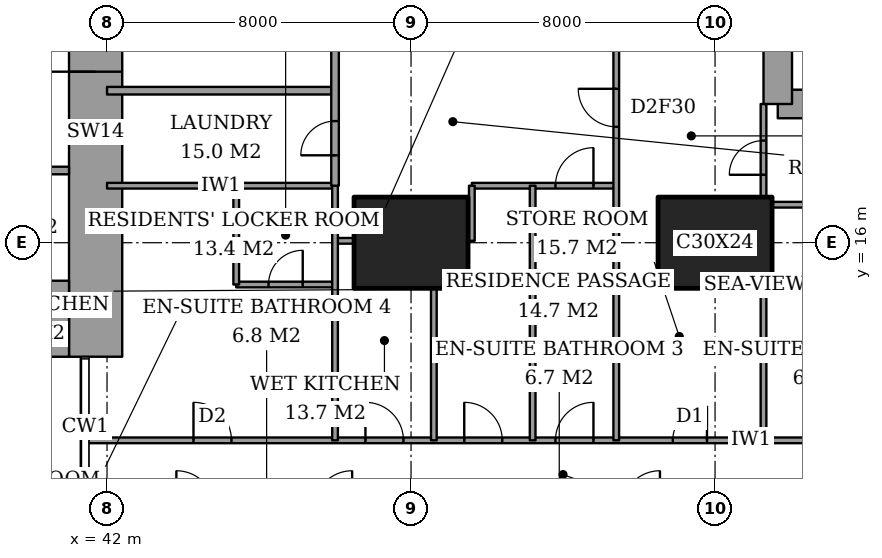
"""IFC4 building model, lengths in metres.
Left out: names, types, materials, properties, quantities, classifications, styles, units other than length and angle.
Written with IfcOpenShell. Run it as: python <this file> out.ifc"""

import sys

from ifc_helpers import new_model, si_unit, direction, frame, frame_2d, origin, origin_2d, place, context, subcontext, project, spatial, rectangle, extrude, element, fill, save


model = new_model("IFC4")
c1 = context("Model", 3, precision=1e-05, world=origin(), true_north=direction((0.0, 1.0)))
c2 = subcontext(c1, "Body", "Model", "MODEL_VIEW")
j1 = project(units=[si_unit("LENGTHUNIT", "METRE"), si_unit("PLANEANGLEUNIT", "RADIAN")], contexts=[c1])
p1 = place(None, origin())
s1 = spatial("IfcSite", under=j1, at=p1, CompositionType="ELEMENT")
p2 = place(p1, origin())
s2 = spatial("IfcBuilding", under=s1, at=p2, CompositionType="ELEMENT")
p3 = place(p2, frame((0.0, 0.0, 51.2)))
s3 = spatial("IfcBuildingStorey", under=s2, at=p3, CompositionType="ELEMENT", Elevation=51.2)
for number, where, z_axis, x_axis in (
    (1, (50.0, 16.0, 0.0), (0.0, 0.0, 1.0), (1.0, 0.0, 0.0)),
    (2, (58.0, 16.0, 0.0), (0.0, 0.0, 1.0), (1.0, 0.0, 0.0)),
):
    element("IfcColumn", number, at=place(p3, frame(where, z_axis=z_axis, x_axis=x_axis)), inside=s3, PredefinedType="COLUMN", context=c2, shape_type="SweptSolid", body=[
        extrude(rectangle(XDim=3.0, YDim=2.4, at=origin_2d()), origin(), (0.0, 0.0, 1.0), 3.6),
    ])
p4 = place(p3, frame((37.85, 14.0, 0.0), z_axis=(0.0, 0.0, 1.0), x_axis=(1.0, 0.0, 0.0)))
e3 = element("IfcWall", 3, at=p4, inside=s3, PredefinedType="SHEAR", context=c2, shape_type="SweptSolid", body=[
    extrude(rectangle(XDim=3.15, YDim=2.0, at=frame_2d((1.575, 0.0))), origin(), (0.0, 0.0, 1.0), 3.6),
])
p5 = place(p3, frame((41.7, 13.0, 0.0), z_axis=(0.0, 0.0, 1.0), x_axis=(0.0, 1.0, 0.0)))
e4 = element("IfcWall", 4, at=p5, inside=s3, PredefinedType="SHEAR", context=c2, shape_type="SweptSolid", body=[
    extrude(rectangle(XDim=11.85, YDim=1.4, at=frame_2d((5.925, 0.0))), origin(), (0.0, 0.0, 1.0), 3.6),
])
p6 = place(p5, frame((7.5, 0.0, 0.0)))
e5 = element("IfcOpeningElement", 5, at=p6, cuts=e4, PredefinedType="OPENING", context=c2, shape_type="SweptSolid", body=[
    extrude(rectangle(XDim=1.8, YDim=2.4, at=frame_2d((0.9, 1.2))), frame((0.0, 0.71, 0.0), z_axis=(0.0, -1.0, 0.0), x_axis=(1.0, 0.0, 0.0)), (0.0, 0.0, 1.0), 1.42),
])
p7 = place(p3, frame((59.65, 19.65, 0.0), z_axis=(0.0, 0.0, 1.0), x_axis=(1.0, 0.0, 0.0)))
e6 = element("IfcWall", 6, at=p7, inside=s3, PredefinedType="SHEAR", context=c2, shape_type="SweptSolid", body=[
    extrude(rectangle(XDim=4.45, YDim=0.75, at=frame_2d((2.225, 0.0))), origin(), (0.0, 0.0, 1.0), 3.6),
])
p8 = place(p3, frame((59.65, 28.35, 0.0), z_axis=(0.0, 0.0, 1.0), x_axis=(0.0, -1.0, 0.0)))
e7 = element("IfcWall", 7, at=p8, inside=s3, PredefinedType="SHEAR", context=c2, shape_type="SweptSolid", body=[
    extrude(rectangle(XDim=8.7, YDim=0.75, at=frame_2d((4.35, 0.0))), origin(), (0.0, 0.0, 1.0), 3.6),
])
p9 = place(p8, frame((0.975, 0.0, 0.0)))
e8 = element("IfcOpeningElement", 8, at=p9, cuts=e7, PredefinedType="OPENING", context=c2, shape_type="SweptSolid", body=[
    extrude(rectangle(XDim=1.0, YDim=2.1, at=frame_2d((0.5, 1.05))), frame((0.0, 0.385, 0.0), z_axis=(0.0, -1.0, 0.0), x_axis=(1.0, 0.0, 0.0)), (0.0, 0.0, 1.0), 0.77),
])
p10 = place(p3, frame((41.439, 10.8, 0.0), z_axis=(0.0, 0.0, 1.0), x_axis=(1.0, 0.0, 0.0)))
e9 = element("IfcWall", 9, at=p10, inside=s3, PredefinedType="PARTITIONING", context=c2, shape_type="SweptSolid", body=[
    extrude(rectangle(XDim=25.011, YDim=0.15, at=frame_2d((12.505, 0.0))), origin(), (0.0, 0.0, 1.0), 3.35),
])
p11 = place(p10, frame((12.361, 0.0, 0.0)))
e10 = element("IfcOpeningElement", 10, at=p11, cuts=e9, PredefinedType="OPENING", context=c2, shape_type="SweptSolid", body=[
    extrude(rectangle(XDim=1.0, YDim=2.1, at=frame_2d((0.5, 1.05))), frame((0.0, 0.085, 0.0), z_axis=(0.0, -1.0, 0.0), x_axis=(1.0, 0.0, 0.0)), (0.0, 0.0, 1.0), 0.17),
])
p12 = place(p10, frame((20.924, 0.0, 0.0)))
e11 = element("IfcOpeningElement", 11, at=p12, cuts=e9, PredefinedType="OPENING", context=c2, shape_type="SweptSolid", body=[
    extrude(rectangle(XDim=1.0, YDim=2.1, at=frame_2d((0.5, 1.05))), frame((0.0, 0.085, 0.0), z_axis=(0.0, -1.0, 0.0), x_axis=(1.0, 0.0, 0.0)), (0.0, 0.0, 1.0), 0.17),
])
p13 = place(p10, frame((15.448, 0.0, 0.0)))
e12 = element("IfcOpeningElement", 12, at=p13, cuts=e9, PredefinedType="OPENING", context=c2, shape_type="SweptSolid", body=[
    extrude(rectangle(XDim=0.9, YDim=2.1, at=frame_2d((0.45, 1.05))), frame((0.0, 0.085, 0.0), z_axis=(0.0, -1.0, 0.0), x_axis=(1.0, 0.0, 0.0)), (0.0, 0.0, 1.0), 0.17),
])
p14 = place(p10, frame((9.961, 0.0, 0.0)))
e13 = element("IfcOpeningElement", 13, at=p14, cuts=e9, PredefinedType="OPENING", context=c2, shape_type="SweptSolid", body=[
    extrude(rectangle(XDim=1.0, YDim=2.1, at=frame_2d((0.5, 1.05))), frame((0.0, 0.085, 0.0), z_axis=(0.0, -1.0, 0.0), x_axis=(1.0, 0.0, 0.0)), (0.0, 0.0, 1.0), 0.17),
])
p15 = place(p10, frame((7.361, 0.0, 0.0)))
e14 = element("IfcOpeningElement", 14, at=p15, cuts=e9, PredefinedType="OPENING", context=c2, shape_type="SweptSolid", body=[
    extrude(rectangle(XDim=1.0, YDim=2.1, at=frame_2d((0.5, 1.05))), frame((0.0, 0.085, 0.0), z_axis=(0.0, -1.0, 0.0), x_axis=(1.0, 0.0, 0.0)), (0.0, 0.0, 1.0), 0.17),
])
p16 = place(p10, frame((2.836, 0.0, 0.0)))
e15 = element("IfcOpeningElement", 15, at=p16, cuts=e9, PredefinedType="OPENING", context=c2, shape_type="SweptSolid", body=[
    extrude(rectangle(XDim=1.0, YDim=2.1, at=frame_2d((0.5, 1.05))), frame((0.0, 0.085, 0.0), z_axis=(0.0, -1.0, 0.0), x_axis=(1.0, 0.0, 0.0)), (0.0, 0.0, 1.0), 0.17),
])
p17 = place(p3, frame((45.4, 14.9, 0.0), z_axis=(0.0, 0.0, 1.0), x_axis=(1.0, 0.0, 0.0)))
e16 = element("IfcWall", 16, at=p17, inside=s3, PredefinedType="PARTITIONING", context=c2, shape_type="SweptSolid", body=[
    extrude(rectangle(XDim=2.6, YDim=0.15, at=frame_2d((1.3, 0.0))), origin(), (0.0, 0.0, 1.0), 3.35),
])
p18 = place(p17, frame((0.85, 0.0, 0.0)))
e17 = element("IfcOpeningElement", 17, at=p18, cuts=e16, PredefinedType="OPENING", context=c2, shape_type="SweptSolid", body=[
    extrude(rectangle(XDim=0.9, YDim=2.1, at=frame_2d((0.45, 1.05))), frame((0.0, 0.085, 0.0), z_axis=(0.0, -1.0, 0.0), x_axis=(1.0, 0.0, 0.0)), (0.0, 0.0, 1.0), 0.17),
])
p19 = place(p3, frame((55.4, 15.0, 0.0), z_axis=(0.0, 0.0, 1.0), x_axis=(1.0, 0.0, 0.0)))
e18 = element("IfcWall", 18, at=p19, inside=s3, PredefinedType="PARTITIONING", context=c2, shape_type="SweptSolid", body=[
    extrude(rectangle(XDim=1.1, YDim=0.15, at=frame_2d((0.55, 0.0))), origin(), (0.0, 0.0, 1.0), 3.35),
])
p20 = place(p3, frame((48.0, 16.05, 0.0), z_axis=(0.0, 0.0, 1.0), x_axis=(1.0, 0.0, 0.0)))
e19 = element("IfcWall", 19, at=p20, inside=s3, PredefinedType="PARTITIONING", context=c2, shape_type="SweptSolid", body=[
    extrude(rectangle(XDim=0.5, YDim=0.15, at=frame_2d((0.25, 0.0))), origin(), (0.0, 0.0, 1.0), 2.634),
])
p21 = place(p3, frame((59.5, 17.0, 0.0), z_axis=(0.0, 0.0, 1.0), x_axis=(1.0, 0.0, 0.0)))
e20 = element("IfcWall", 20, at=p21, inside=s3, PredefinedType="PARTITIONING", context=c2, shape_type="SweptSolid", body=[
    extrude(rectangle(XDim=5.15, YDim=0.15, at=frame_2d((2.575, 0.0))), origin(), (0.0, 0.0, 1.0), 3.35),
])
p22 = place(p3, frame((42.0, 17.5, 0.0), z_axis=(0.0, 0.0, 1.0), x_axis=(1.0, 0.0, 0.0)))
e21 = element("IfcWall", 21, at=p22, inside=s3, PredefinedType="PARTITIONING", context=c2, shape_type="SweptSolid", body=[
    extrude(rectangle(XDim=6.0, YDim=0.15, at=frame_2d((3.0, 0.0))), origin(), (0.0, 0.0, 1.0), 3.35),
])
p23 = place(p3, frame((51.6, 17.5, 0.0), z_axis=(0.0, 0.0, 1.0), x_axis=(1.0, 0.0, 0.0)))
e22 = element("IfcWall", 22, at=p23, inside=s3, PredefinedType="PARTITIONING", context=c2, shape_type="SweptSolid", body=[
    extrude(rectangle(XDim=3.8, YDim=0.15, at=frame_2d((1.9, 0.0))), origin(), (0.0, 0.0, 1.0), 3.35),
])
p24 = place(p23, frame((2.2, 0.0, 0.0)))
e23 = element("IfcOpeningElement", 23, at=p24, cuts=e22, PredefinedType="OPENING", context=c2, shape_type="SweptSolid", body=[
    extrude(rectangle(XDim=1.0, YDim=2.1, at=frame_2d((0.5, 1.05))), frame((0.0, 0.085, 0.0), z_axis=(0.0, -1.0, 0.0), x_axis=(1.0, 0.0, 0.0)), (0.0, 0.0, 1.0), 0.17),
])
p25 = place(p3, frame((42.0, 20.0, 0.0), z_axis=(0.0, 0.0, 1.0), x_axis=(1.0, 0.0, 0.0)))
e24 = element("IfcWall", 24, at=p25, inside=s3, PredefinedType="PARTITIONING", context=c2, shape_type="SweptSolid", body=[
    extrude(rectangle(XDim=6.0, YDim=0.2, at=frame_2d((3.0, 0.0))), origin(), (0.0, 0.0, 1.0), 3.35),
])
p26 = place(p3, frame((45.4, 14.9, 0.0), z_axis=(0.0, 0.0, 1.0), x_axis=(0.0, 1.0, 0.0)))
e25 = element("IfcWall", 25, at=p26, inside=s3, PredefinedType="PARTITIONING", context=c2, shape_type="SweptSolid", body=[
    extrude(rectangle(XDim=2.6, YDim=0.15, at=frame_2d((1.3, 0.0))), origin(), (0.0, 0.0, 1.0), 3.35),
])
p27 = place(p3, frame((48.0, 17.5, 0.0), z_axis=(0.0, 0.0, 1.0), x_axis=(0.0, 1.0, 0.0)))
e26 = element("IfcWall", 26, at=p27, inside=s3, PredefinedType="PARTITIONING", context=c2, shape_type="SweptSolid", body=[
    extrude(rectangle(XDim=6.5, YDim=0.2, at=frame_2d((3.25, 0.0))), origin(), (0.0, 0.0, 1.0), 3.35),
])
p28 = place(p27, frame((3.9, 0.0, 0.0)))
e27 = element("IfcOpeningElement", 27, at=p28, cuts=e26, PredefinedType="OPENING", context=c2, shape_type="SweptSolid", body=[
    extrude(rectangle(XDim=1.2, YDim=2.4, at=frame_2d((0.6, 1.2))), frame((0.0, 0.11, 0.0), z_axis=(0.0, -1.0, 0.0), x_axis=(1.0, 0.0, 0.0)), (0.0, 0.0, 1.0), 0.22),
])
p29 = place(p27, frame((0.8, 0.0, 0.0)))
e28 = element("IfcOpeningElement", 28, at=p29, cuts=e26, PredefinedType="OPENING", context=c2, shape_type="SweptSolid", body=[
    extrude(rectangle(XDim=0.9, YDim=2.1, at=frame_2d((0.45, 1.05))), frame((0.0, 0.11, 0.0), z_axis=(0.0, -1.0, 0.0), x_axis=(1.0, 0.0, 0.0)), (0.0, 0.0, 1.0), 0.22),
])
p30 = place(p3, frame((48.0, 10.8, 0.0), z_axis=(0.0, 0.0, 1.0), x_axis=(0.0, 1.0, 0.0)))
e29 = element("IfcWall", 29, at=p30, inside=s3, PredefinedType="PARTITIONING", context=c2, shape_type="SweptSolid", body=[
    extrude(rectangle(XDim=6.7, YDim=0.15, at=frame_2d((3.35, 0.0))), origin(), (0.0, 0.0, 1.0), 3.35),
])
p31 = place(p3, frame((50.6, 10.8, 0.0), z_axis=(0.0, 0.0, 1.0), x_axis=(0.0, 1.0, 0.0)))
e30 = element("IfcWall", 30, at=p31, inside=s3, PredefinedType="PARTITIONING", context=c2, shape_type="SweptSolid", body=[
    extrude(rectangle(XDim=4.0, YDim=0.15, at=frame_2d((2.0, 0.0))), origin(), (0.0, 0.0, 1.0), 3.35),
])
p32 = place(p3, frame((51.6, 16.05, 0.0), z_axis=(0.0, 0.0, 1.0), x_axis=(0.0, 1.0, 0.0)))
e31 = element("IfcWall", 31, at=p32, inside=s3, PredefinedType="PARTITIONING", context=c2, shape_type="SweptSolid", body=[
    extrude(rectangle(XDim=1.45, YDim=0.15, at=frame_2d((0.725, 0.0))), origin(), (0.0, 0.0, 1.0), 3.35),
])
p33 = place(p3, frame((53.2, 10.8, 0.0), z_axis=(0.0, 0.0, 1.0), x_axis=(0.0, 1.0, 0.0)))
e32 = element("IfcWall", 32, at=p33, inside=s3, PredefinedType="PARTITIONING", context=c2, shape_type="SweptSolid", body=[
    extrude(rectangle(XDim=6.7, YDim=0.15, at=frame_2d((3.35, 0.0))), origin(), (0.0, 0.0, 1.0), 3.35),
])
p34 = place(p3, frame((55.4, 10.8, 0.0), z_axis=(0.0, 0.0, 1.0), x_axis=(0.0, 1.0, 0.0)))
e33 = element("IfcWall", 33, at=p34, inside=s3, PredefinedType="PARTITIONING", context=c2, shape_type="SweptSolid", body=[
    extrude(rectangle(XDim=10.8, YDim=0.15, at=frame_2d((5.4, 0.0))), origin(), (0.0, 0.0, 1.0), 3.35),
])
p35 = place(p34, frame((8.25, 0.0, 0.0)))
e34 = element("IfcOpeningElement", 34, at=p35, cuts=e33, PredefinedType="OPENING", context=c2, shape_type="SweptSolid", body=[
    extrude(rectangle(XDim=1.0, YDim=2.1, at=frame_2d((0.5, 1.05))), frame((0.0, 0.085, 0.0), z_axis=(0.0, -1.0, 0.0), x_axis=(1.0, 0.0, 0.0)), (0.0, 0.0, 1.0), 0.17),
])
p36 = place(p3, frame((59.275, 10.8, 0.0), z_axis=(0.0, 0.0, 1.0), x_axis=(0.0, 1.0, 0.0)))
e35 = element("IfcWall", 35, at=p36, inside=s3, PredefinedType="PARTITIONING", context=c2, shape_type="SweptSolid", body=[
    extrude(rectangle(XDim=4.0, YDim=0.15, at=frame_2d((2.0, 0.0))), origin(), (0.0, 0.0, 1.0), 3.35),
])
p37 = place(p3, frame((59.275, 17.2, 0.0), z_axis=(0.0, 0.0, 1.0), x_axis=(0.0, 1.0, 0.0)))
e36 = element("IfcWall", 36, at=p37, inside=s3, PredefinedType="PARTITIONING", context=c2, shape_type="SweptSolid", body=[
    extrude(rectangle(XDim=2.45, YDim=0.15, at=frame_2d((1.225, 0.0))), origin(), (0.0, 0.0, 1.0), 3.35),
])
p38 = place(p37, frame((0.587, 0.0, 0.0)))
e37 = element("IfcOpeningElement", 37, at=p38, cuts=e36, PredefinedType="OPENING", context=c2, shape_type="SweptSolid", body=[
    extrude(rectangle(XDim=0.9, YDim=2.1, at=frame_2d((0.45, 1.05))), frame((0.0, 0.085, 0.0), z_axis=(0.0, -1.0, 0.0), x_axis=(1.0, 0.0, 0.0)), (0.0, 0.0, 1.0), 0.17),
])
p39 = place(p3, frame((28.3, 17.9, 0.0), z_axis=(0.0, 0.0, 1.0), x_axis=(1.0, 0.0, 0.0)))
e38 = element("IfcWall", 38, at=p39, inside=s3, PredefinedType="PARTITIONING", context=c2, shape_type="SweptSolid", body=[
    extrude(rectangle(XDim=12.7, YDim=0.2, at=frame_2d((6.35, 0.0))), origin(), (0.0, 0.0, 1.0), 3.6),
])
p40 = place(p39, frame((0.95, 0.0, 0.0)))
e39 = element("IfcOpeningElement", 39, at=p40, cuts=e38, PredefinedType="OPENING", context=c2, shape_type="SweptSolid", body=[
    extrude(rectangle(XDim=1.1, YDim=2.1, at=frame_2d((0.55, 1.05))), frame((0.0, 0.11, 0.0), z_axis=(0.0, -1.0, 0.0), x_axis=(1.0, 0.0, 0.0)), (0.0, 0.0, 1.0), 0.22),
])
p41 = place(p39, frame((4.15, 0.0, 0.0)))
e40 = element("IfcOpeningElement", 40, at=p41, cuts=e38, PredefinedType="OPENING", context=c2, shape_type="SweptSolid", body=[
    extrude(rectangle(XDim=1.1, YDim=2.1, at=frame_2d((0.55, 1.05))), frame((0.0, 0.11, 0.0), z_axis=(0.0, -1.0, 0.0), x_axis=(1.0, 0.0, 0.0)), (0.0, 0.0, 1.0), 0.22),
])
p42 = place(p39, frame((7.35, 0.0, 0.0)))
e41 = element("IfcOpeningElement", 41, at=p42, cuts=e38, PredefinedType="OPENING", context=c2, shape_type="SweptSolid", body=[
    extrude(rectangle(XDim=1.1, YDim=2.1, at=frame_2d((0.55, 1.05))), frame((0.0, 0.11, 0.0), z_axis=(0.0, -1.0, 0.0), x_axis=(1.0, 0.0, 0.0)), (0.0, 0.0, 1.0), 0.22),
])
p43 = place(p39, frame((10.6, 0.0, 0.0)))
e42 = element("IfcOpeningElement", 42, at=p43, cuts=e38, PredefinedType="OPENING", context=c2, shape_type="SweptSolid", body=[
    extrude(rectangle(XDim=1.2, YDim=2.1, at=frame_2d((0.6, 1.05))), frame((0.0, 0.11, 0.0), z_axis=(0.0, -1.0, 0.0), x_axis=(1.0, 0.0, 0.0)), (0.0, 0.0, 1.0), 0.22),
])
p44 = place(p11, origin())
e43 = element("IfcDoor", 43, at=p44, inside=s3, OperationType="SINGLE_SWING_LEFT", PredefinedType="DOOR", context=c2, shape_type="SweptSolid", body=[
    extrude(rectangle(XDim=1.0, YDim=2.1, at=frame_2d((0.5, 1.05))), frame((0.0, 0.025, 0.0), z_axis=(0.0, -1.0, 0.0), x_axis=(1.0, 0.0, 0.0)), (0.0, 0.0, 1.0), 0.05),
])
fill(e10, e43)
p45 = place(p38, origin())
e44 = element("IfcDoor", 44, at=p45, inside=s3, OperationType="SINGLE_SWING_RIGHT", PredefinedType="DOOR", context=c2, shape_type="SweptSolid", body=[
    extrude(rectangle(XDim=0.9, YDim=2.1, at=frame_2d((0.45, 1.05))), frame((0.0, 0.025, 0.0), z_axis=(0.0, -1.0, 0.0), x_axis=(1.0, 0.0, 0.0)), (0.0, 0.0, 1.0), 0.05),
])
fill(e37, e44)
p46 = place(p13, origin())
e45 = element("IfcDoor", 45, at=p46, inside=s3, OperationType="SINGLE_SWING_LEFT", PredefinedType="DOOR", context=c2, shape_type="SweptSolid", body=[
    extrude(rectangle(XDim=0.9, YDim=2.1, at=frame_2d((0.45, 1.05))), frame((0.0, 0.025, 0.0), z_axis=(0.0, -1.0, 0.0), x_axis=(1.0, 0.0, 0.0)), (0.0, 0.0, 1.0), 0.05),
])
fill(e12, e45)
p47 = place(p35, origin())
e46 = element("IfcDoor", 46, at=p47, inside=s3, OperationType="SINGLE_SWING_LEFT", PredefinedType="DOOR", context=c2, shape_type="SweptSolid", body=[
    extrude(rectangle(XDim=1.0, YDim=2.1, at=frame_2d((0.5, 1.05))), frame((0.0, 0.025, 0.0), z_axis=(0.0, -1.0, 0.0), x_axis=(1.0, 0.0, 0.0)), (0.0, 0.0, 1.0), 0.05),
])
fill(e34, e46)
p48 = place(p24, origin())
e47 = element("IfcDoor", 47, at=p48, inside=s3, OperationType="SINGLE_SWING_LEFT", PredefinedType="DOOR", context=c2, shape_type="SweptSolid", body=[
    extrude(rectangle(XDim=1.0, YDim=2.1, at=frame_2d((0.5, 1.05))), frame((0.0, 0.025, 0.0), z_axis=(0.0, -1.0, 0.0), x_axis=(1.0, 0.0, 0.0)), (0.0, 0.0, 1.0), 0.05),
])
fill(e23, e47)
p49 = place(p14, origin())
e48 = element("IfcDoor", 48, at=p49, inside=s3, OperationType="SINGLE_SWING_RIGHT", PredefinedType="DOOR", context=c2, shape_type="SweptSolid", body=[
    extrude(rectangle(XDim=1.0, YDim=2.1, at=frame_2d((0.5, 1.05))), frame((0.0, 0.025, 0.0), z_axis=(0.0, -1.0, 0.0), x_axis=(1.0, 0.0, 0.0)), (0.0, 0.0, 1.0), 0.05),
])
fill(e13, e48)
p50 = place(p15, origin())
e49 = element("IfcDoor", 49, at=p50, inside=s3, OperationType="SINGLE_SWING_RIGHT", PredefinedType="DOOR", context=c2, shape_type="SweptSolid", body=[
    extrude(rectangle(XDim=1.0, YDim=2.1, at=frame_2d((0.5, 1.05))), frame((0.0, 0.025, 0.0), z_axis=(0.0, -1.0, 0.0), x_axis=(1.0, 0.0, 0.0)), (0.0, 0.0, 1.0), 0.05),
])
fill(e14, e49)
p51 = place(p18, origin())
e50 = element("IfcDoor", 50, at=p51, inside=s3, OperationType="SINGLE_SWING_LEFT", PredefinedType="DOOR", context=c2, shape_type="SweptSolid", body=[
    extrude(rectangle(XDim=0.9, YDim=2.1, at=frame_2d((0.45, 1.05))), frame((0.0, 0.025, 0.0), z_axis=(0.0, -1.0, 0.0), x_axis=(1.0, 0.0, 0.0)), (0.0, 0.0, 1.0), 0.05),
])
fill(e17, e50)
p52 = place(p16, origin())
e51 = element("IfcDoor", 51, at=p52, inside=s3, OperationType="SINGLE_SWING_RIGHT", PredefinedType="DOOR", context=c2, shape_type="SweptSolid", body=[
    extrude(rectangle(XDim=1.0, YDim=2.1, at=frame_2d((0.5, 1.05))), frame((0.0, 0.025, 0.0), z_axis=(0.0, -1.0, 0.0), x_axis=(1.0, 0.0, 0.0)), (0.0, 0.0, 1.0), 0.05),
])
fill(e15, e51)
p53 = place(p29, origin())
e52 = element("IfcDoor", 52, at=p53, inside=s3, OperationType="SINGLE_SWING_RIGHT", PredefinedType="DOOR", context=c2, shape_type="SweptSolid", body=[
    extrude(rectangle(XDim=0.9, YDim=2.1, at=frame_2d((0.45, 1.05))), frame((0.0, 0.025, 0.0), z_axis=(0.0, -1.0, 0.0), x_axis=(1.0, 0.0, 0.0)), (0.0, 0.0, 1.0), 0.05),
])
fill(e28, e52)
p54 = place(p6, origin())
e53 = element("IfcDoor", 53, at=p54, inside=s3, OperationType="DOUBLE_DOOR_DOUBLE_SWING", PredefinedType="DOOR", context=c2, shape_type="SweptSolid", body=[
    extrude(rectangle(XDim=1.8, YDim=2.4, at=frame_2d((0.9, 1.2))), frame((0.0, 0.025, 0.0), z_axis=(0.0, -1.0, 0.0), x_axis=(1.0, 0.0, 0.0)), (0.0, 0.0, 1.0), 0.05),
])
fill(e5, e53)
save(model, sys.argv[1])
